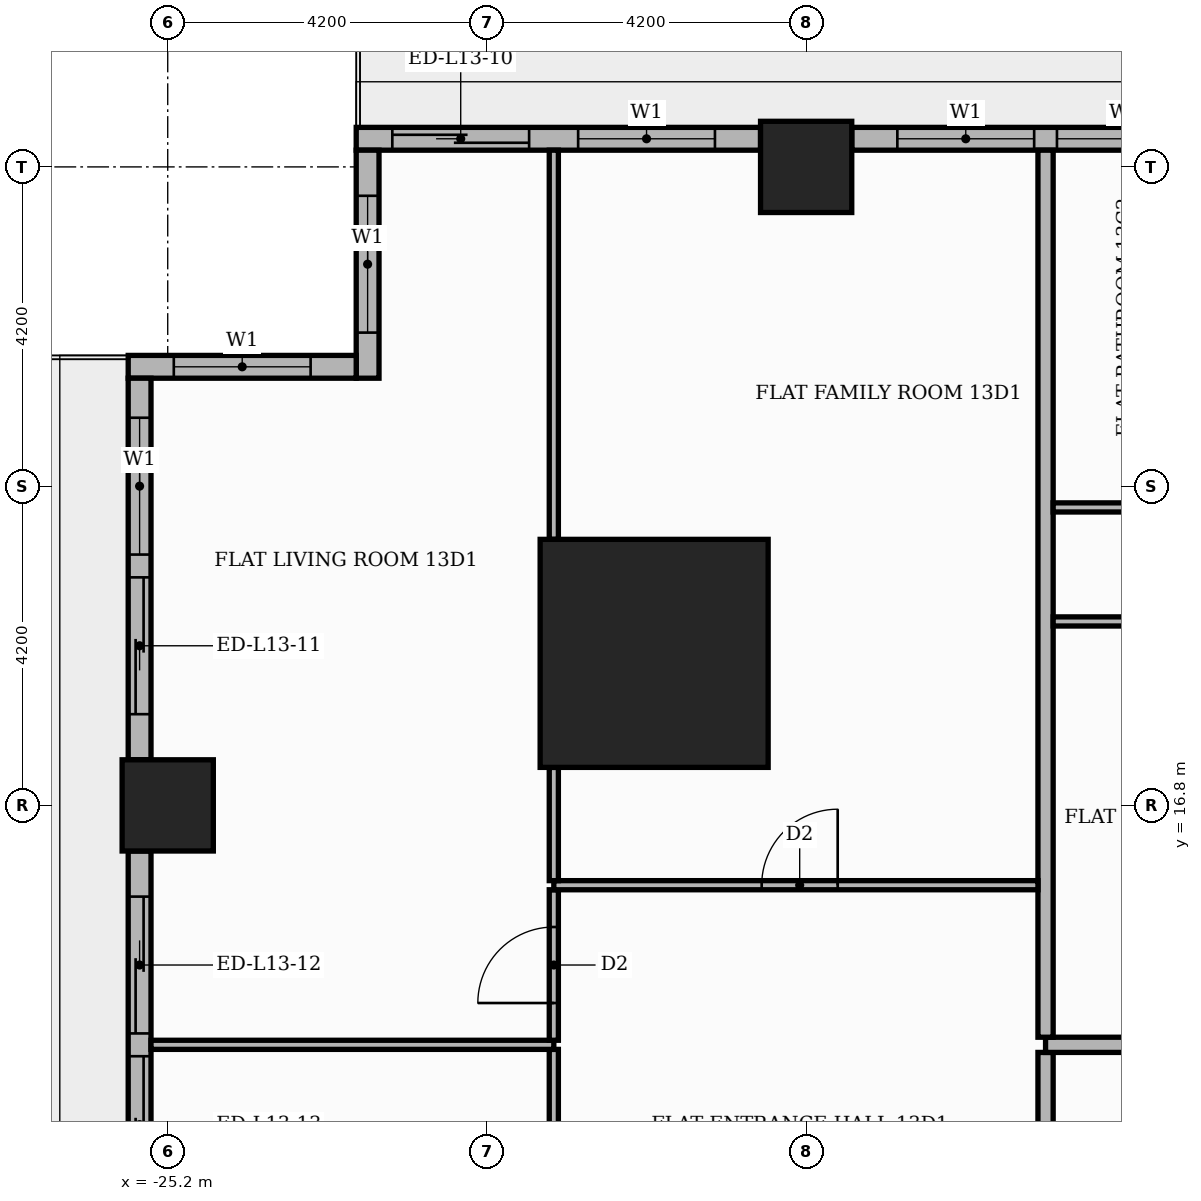
"""IFC4 building model, lengths in metres.
Left out: names, types, materials, properties, quantities, classifications, styles, units other than length and angle.
Written with IfcOpenShell. Run it as: python <this file> out.ifc"""

import sys

from ifc_helpers import new_model, si_unit, direction, frame, frame_2d, origin, origin_2d, place, context, subcontext, project, spatial, rectangle, extrude, element, fill, save


model = new_model("IFC4")
c1 = context("Model", 3, precision=1e-05, world=origin(), true_north=direction((0.0, 1.0)))
c2 = subcontext(c1, "Body", "Model", "MODEL_VIEW")
j1 = project(units=[si_unit("LENGTHUNIT", "METRE"), si_unit("PLANEANGLEUNIT", "RADIAN")], contexts=[c1])
p1 = place(None, origin())
s1 = spatial("IfcSite", under=j1, at=p1, CompositionType="ELEMENT")
p2 = place(p1, origin())
s2 = spatial("IfcBuilding", under=s1, at=p2, CompositionType="ELEMENT")
p3 = place(p2, frame((0.0, 0.0, 58.2)))
s3 = spatial("IfcBuildingStorey", under=s2, at=p3, CompositionType="ELEMENT", Elevation=58.2)
p4 = place(p3, frame((-18.8, 18.8, 0.0), z_axis=(0.0, 0.0, 1.0), x_axis=(1.0, 0.0, 0.0)))
e1 = element("IfcColumn", 1, at=p4, inside=s3, PredefinedType="COLUMN", context=c2, shape_type="SweptSolid", body=[
    extrude(rectangle(XDim=3.0, YDim=3.0, at=origin_2d()), origin(), (0.0, 0.0, 1.0), 3.9),
])
for number, where, z_axis, x_axis in (
    (2, (-16.8, 25.2, 0.0), (0.0, 0.0, 1.0), (1.0, 0.0, 0.0)),
    (3, (-25.2, 16.8, 0.0), (0.0, 0.0, 1.0), (1.0, 0.0, 0.0)),
):
    element("IfcColumn", number, at=place(p3, frame(where, z_axis=z_axis, x_axis=x_axis)), inside=s3, PredefinedType="COLUMN", context=c2, shape_type="SweptSolid", body=[
        extrude(rectangle(XDim=1.2, YDim=1.2, at=origin_2d()), origin(), (0.0, 0.0, 1.0), 3.9),
    ])
p5 = place(p3, frame((-9.0, 25.57, 0.0), z_axis=(0.0, 0.0, 1.0), x_axis=(-1.0, 0.0, 0.0)))
e4 = element("IfcWall", 4, at=p5, inside=s3, PredefinedType="STANDARD", context=c2, shape_type="SweptSolid", body=[
    extrude(rectangle(XDim=7.2, YDim=0.3, at=frame_2d((3.6, 0.0))), origin(), (0.0, 0.0, 1.0), 3.48),
])
p6 = place(p5, frame((0.6, 0.0, 0.9)))
e5 = element("IfcOpeningElement", 5, at=p6, cuts=e4, PredefinedType="OPENING", context=c2, shape_type="SweptSolid", body=[
    extrude(rectangle(XDim=1.8, YDim=2.1, at=frame_2d((0.9, 1.05))), frame((0.0, 0.16, 0.0), z_axis=(0.0, -1.0, 0.0), x_axis=(1.0, 0.0, 0.0)), (0.0, 0.0, 1.0), 0.32),
])
p7 = place(p5, frame((2.7, 0.0, 0.9)))
e6 = element("IfcOpeningElement", 6, at=p7, cuts=e4, PredefinedType="OPENING", context=c2, shape_type="SweptSolid", body=[
    extrude(rectangle(XDim=1.8, YDim=2.1, at=frame_2d((0.9, 1.05))), frame((0.0, 0.16, 0.0), z_axis=(0.0, -1.0, 0.0), x_axis=(1.0, 0.0, 0.0)), (0.0, 0.0, 1.0), 0.32),
])
p8 = place(p5, frame((4.8, 0.0, 0.9)))
e7 = element("IfcOpeningElement", 7, at=p8, cuts=e4, PredefinedType="OPENING", context=c2, shape_type="SweptSolid", body=[
    extrude(rectangle(XDim=1.8, YDim=2.1, at=frame_2d((0.9, 1.05))), frame((0.0, 0.16, 0.0), z_axis=(0.0, -1.0, 0.0), x_axis=(1.0, 0.0, 0.0)), (0.0, 0.0, 1.0), 0.32),
])
p9 = place(p3, frame((-17.4, 25.57, 0.0), z_axis=(0.0, 0.0, 1.0), x_axis=(-1.0, 0.0, 0.0)))
e8 = element("IfcWall", 8, at=p9, inside=s3, PredefinedType="STANDARD", context=c2, shape_type="SweptSolid", body=[
    extrude(rectangle(XDim=5.32, YDim=0.3, at=frame_2d((2.66, 0.0))), origin(), (0.0, 0.0, 1.0), 3.48),
])
p10 = place(p9, frame((0.6, 0.0, 0.9)))
e9 = element("IfcOpeningElement", 9, at=p10, cuts=e8, PredefinedType="OPENING", context=c2, shape_type="SweptSolid", body=[
    extrude(rectangle(XDim=1.8, YDim=2.1, at=frame_2d((0.9, 1.05))), frame((0.0, 0.16, 0.0), z_axis=(0.0, -1.0, 0.0), x_axis=(1.0, 0.0, 0.0)), (0.0, 0.0, 1.0), 0.32),
])
p11 = place(p9, frame((3.045, 0.0, 0.0)))
e10 = element("IfcOpeningElement", 10, at=p11, cuts=e8, PredefinedType="OPENING", context=c2, shape_type="SweptSolid", body=[
    extrude(rectangle(XDim=1.8, YDim=2.4, at=frame_2d((0.9, 1.2))), frame((0.0, 0.16, 0.0), z_axis=(0.0, -1.0, 0.0), x_axis=(1.0, 0.0, 0.0)), (0.0, 0.0, 1.0), 0.32),
])
p12 = place(p3, frame((-22.57, 25.42, 0.0), z_axis=(0.0, 0.0, 1.0), x_axis=(0.0, -1.0, 0.0)))
e11 = element("IfcWall", 11, at=p12, inside=s3, PredefinedType="STANDARD", context=c2, shape_type="SweptSolid", body=[
    extrude(rectangle(XDim=3.0, YDim=0.3, at=frame_2d((1.5, 0.0))), origin(), (0.0, 0.0, 1.0), 3.48),
])
p13 = place(p12, frame((0.6, 0.0, 0.9)))
e12 = element("IfcOpeningElement", 12, at=p13, cuts=e11, PredefinedType="OPENING", context=c2, shape_type="SweptSolid", body=[
    extrude(rectangle(XDim=1.8, YDim=2.1, at=frame_2d((0.9, 1.05))), frame((0.0, 0.16, 0.0), z_axis=(0.0, -1.0, 0.0), x_axis=(1.0, 0.0, 0.0)), (0.0, 0.0, 1.0), 0.32),
])
p14 = place(p3, frame((-22.72, 22.57, 0.0), z_axis=(0.0, 0.0, 1.0), x_axis=(-1.0, 0.0, 0.0)))
e13 = element("IfcWall", 13, at=p14, inside=s3, PredefinedType="STANDARD", context=c2, shape_type="SweptSolid", body=[
    extrude(rectangle(XDim=3.0, YDim=0.3, at=frame_2d((1.5, 0.0))), origin(), (0.0, 0.0, 1.0), 3.48),
])
p15 = place(p14, frame((0.6, 0.0, 0.9)))
e14 = element("IfcOpeningElement", 14, at=p15, cuts=e13, PredefinedType="OPENING", context=c2, shape_type="SweptSolid", body=[
    extrude(rectangle(XDim=1.8, YDim=2.1, at=frame_2d((0.9, 1.05))), frame((0.0, 0.16, 0.0), z_axis=(0.0, -1.0, 0.0), x_axis=(1.0, 0.0, 0.0)), (0.0, 0.0, 1.0), 0.32),
])
p16 = place(p3, frame((-25.57, 22.42, 0.0), z_axis=(0.0, 0.0, 1.0), x_axis=(0.0, -1.0, 0.0)))
e15 = element("IfcWall", 15, at=p16, inside=s3, PredefinedType="STANDARD", context=c2, shape_type="SweptSolid", body=[
    extrude(rectangle(XDim=5.02, YDim=0.3, at=frame_2d((2.51, 0.0))), origin(), (0.0, 0.0, 1.0), 3.48),
])
p17 = place(p16, frame((0.52, 0.0, 0.9)))
e16 = element("IfcOpeningElement", 16, at=p17, cuts=e15, PredefinedType="OPENING", context=c2, shape_type="SweptSolid", body=[
    extrude(rectangle(XDim=1.8, YDim=2.1, at=frame_2d((0.9, 1.05))), frame((0.0, 0.16, 0.0), z_axis=(0.0, -1.0, 0.0), x_axis=(1.0, 0.0, 0.0)), (0.0, 0.0, 1.0), 0.32),
])
p18 = place(p16, frame((2.62, 0.0, 0.0)))
e17 = element("IfcOpeningElement", 17, at=p18, cuts=e15, PredefinedType="OPENING", context=c2, shape_type="SweptSolid", body=[
    extrude(rectangle(XDim=1.8, YDim=2.4, at=frame_2d((0.9, 1.2))), frame((0.0, 0.16, 0.0), z_axis=(0.0, -1.0, 0.0), x_axis=(1.0, 0.0, 0.0)), (0.0, 0.0, 1.0), 0.32),
])
p19 = place(p3, frame((-25.57, 16.2, 0.0), z_axis=(0.0, 0.0, 1.0), x_axis=(0.0, -1.0, 0.0)))
e18 = element("IfcWall", 18, at=p19, inside=s3, PredefinedType="STANDARD", context=c2, shape_type="SweptSolid", body=[
    extrude(rectangle(XDim=7.2, YDim=0.3, at=frame_2d((3.6, 0.0))), origin(), (0.0, 0.0, 1.0), 3.48),
])
p20 = place(p19, frame((0.6, 0.0, 0.0)))
e19 = element("IfcOpeningElement", 19, at=p20, cuts=e18, PredefinedType="OPENING", context=c2, shape_type="SweptSolid", body=[
    extrude(rectangle(XDim=1.8, YDim=2.4, at=frame_2d((0.9, 1.2))), frame((0.0, 0.16, 0.0), z_axis=(0.0, -1.0, 0.0), x_axis=(1.0, 0.0, 0.0)), (0.0, 0.0, 1.0), 0.32),
])
p21 = place(p19, frame((2.7, 0.0, 0.0)))
e20 = element("IfcOpeningElement", 20, at=p21, cuts=e18, PredefinedType="OPENING", context=c2, shape_type="SweptSolid", body=[
    extrude(rectangle(XDim=1.8, YDim=2.4, at=frame_2d((0.9, 1.2))), frame((0.0, 0.16, 0.0), z_axis=(0.0, -1.0, 0.0), x_axis=(1.0, 0.0, 0.0)), (0.0, 0.0, 1.0), 0.32),
])
p22 = place(p19, frame((4.8, 0.0, 0.9)))
e21 = element("IfcOpeningElement", 21, at=p22, cuts=e18, PredefinedType="OPENING", context=c2, shape_type="SweptSolid", body=[
    extrude(rectangle(XDim=1.8, YDim=2.1, at=frame_2d((0.9, 1.05))), frame((0.0, 0.16, 0.0), z_axis=(0.0, -1.0, 0.0), x_axis=(1.0, 0.0, 0.0)), (0.0, 0.0, 1.0), 0.32),
])
p23 = place(p3, frame((-13.65, 5.35, 0.0), z_axis=(0.0, 0.0, 1.0), x_axis=(0.0, 1.0, 0.0)))
e22 = element("IfcWall", 22, at=p23, inside=s3, PredefinedType="PARTITIONING", context=c2, shape_type="SweptSolid", body=[
    extrude(rectangle(XDim=8.2, YDim=0.2, at=frame_2d((4.1, 0.0))), origin(), (0.0, 0.0, 1.0), 3.48),
])
p24 = place(p23, frame((5.65, 0.0, 0.0)))
e23 = element("IfcOpeningElement", 23, at=p24, cuts=e22, PredefinedType="OPENING", context=c2, shape_type="SweptSolid", body=[
    extrude(rectangle(XDim=1.1, YDim=2.4, at=frame_2d((0.55, 1.2))), frame((0.0, 0.11, 0.0), z_axis=(0.0, -1.0, 0.0), x_axis=(1.0, 0.0, 0.0)), (0.0, 0.0, 1.0), 0.22),
])
p25 = place(p3, frame((-20.12, 9.51, 0.0), z_axis=(0.0, 0.0, 1.0), x_axis=(0.0, 1.0, 0.0)))
e24 = element("IfcWall", 24, at=p25, inside=s3, PredefinedType="PARTITIONING", context=c2, shape_type="SweptSolid", body=[
    extrude(rectangle(XDim=4.08, YDim=0.12, at=frame_2d((2.04, 0.0))), origin(), (0.0, 0.0, 1.0), 3.48),
])
p26 = place(p25, frame((1.59, 0.0, 0.0)))
e25 = element("IfcOpeningElement", 25, at=p26, cuts=e24, PredefinedType="OPENING", context=c2, shape_type="SweptSolid", body=[
    extrude(rectangle(XDim=0.9, YDim=2.1, at=frame_2d((0.45, 1.05))), frame((0.0, 0.07, 0.0), z_axis=(0.0, -1.0, 0.0), x_axis=(1.0, 0.0, 0.0)), (0.0, 0.0, 1.0), 0.14),
])
p27 = place(p3, frame((-25.42, 13.65, 0.0), z_axis=(0.0, 0.0, 1.0), x_axis=(1.0, 0.0, 0.0)))
e26 = element("IfcWall", 26, at=p27, inside=s3, PredefinedType="PARTITIONING", context=c2, shape_type="SweptSolid", body=[
    extrude(rectangle(XDim=5.3, YDim=0.12, at=frame_2d((2.65, 0.0))), origin(), (0.0, 0.0, 1.0), 3.48),
])
p28 = place(p3, frame((-13.65, 13.65, 0.0), z_axis=(0.0, 0.0, 1.0), x_axis=(1.0, 0.0, 0.0)))
e27 = element("IfcWall", 27, at=p28, inside=s3, PredefinedType="PARTITIONING", context=c2, shape_type="SweptSolid", body=[
    extrude(rectangle(XDim=39.07, YDim=0.2, at=frame_2d((19.535, 0.0))), origin(), (0.0, 0.0, 1.0), 3.48),
])
p29 = place(p28, frame((24.65, 0.0, 0.0)))
e28 = element("IfcOpeningElement", 28, at=p29, cuts=e27, PredefinedType="OPENING", context=c2, shape_type="SweptSolid", body=[
    extrude(rectangle(XDim=1.1, YDim=2.4, at=frame_2d((0.55, 1.2))), frame((0.0, 0.11, 0.0), z_axis=(0.0, -1.0, 0.0), x_axis=(1.0, 0.0, 0.0)), (0.0, 0.0, 1.0), 0.22),
])
p30 = place(p28, frame((14.15, 0.0, 0.0)))
e29 = element("IfcOpeningElement", 29, at=p30, cuts=e27, PredefinedType="OPENING", context=c2, shape_type="SweptSolid", body=[
    extrude(rectangle(XDim=1.1, YDim=2.4, at=frame_2d((0.55, 1.2))), frame((0.0, 0.11, 0.0), z_axis=(0.0, -1.0, 0.0), x_axis=(1.0, 0.0, 0.0)), (0.0, 0.0, 1.0), 0.22),
])
p31 = place(p3, frame((-20.12, 13.71, 0.0), z_axis=(0.0, 0.0, 1.0), x_axis=(0.0, 1.0, 0.0)))
e30 = element("IfcWall", 30, at=p31, inside=s3, PredefinedType="PARTITIONING", context=c2, shape_type="SweptSolid", body=[
    extrude(rectangle(XDim=1.98, YDim=0.12, at=frame_2d((0.99, 0.0))), origin(), (0.0, 0.0, 1.0), 3.48),
])
p32 = place(p31, frame((0.49, 0.0, 0.0)))
e31 = element("IfcOpeningElement", 31, at=p32, cuts=e30, PredefinedType="OPENING", context=c2, shape_type="SweptSolid", body=[
    extrude(rectangle(XDim=1.0, YDim=2.1, at=frame_2d((0.5, 1.05))), frame((0.0, 0.07, 0.0), z_axis=(0.0, -1.0, 0.0), x_axis=(1.0, 0.0, 0.0)), (0.0, 0.0, 1.0), 0.14),
])
p33 = place(p3, frame((-13.65, 13.75, 0.0), z_axis=(0.0, 0.0, 1.0), x_axis=(0.0, 1.0, 0.0)))
e32 = element("IfcWall", 32, at=p33, inside=s3, PredefinedType="PARTITIONING", context=c2, shape_type="SweptSolid", body=[
    extrude(rectangle(XDim=11.67, YDim=0.2, at=frame_2d((5.835, 0.0))), origin(), (0.0, 0.0, 1.0), 3.48),
])
p34 = place(p3, frame((-20.12, 15.75, 0.0), z_axis=(0.0, 0.0, 1.0), x_axis=(1.0, 0.0, 0.0)))
e33 = element("IfcWall", 33, at=p34, inside=s3, PredefinedType="PARTITIONING", context=c2, shape_type="SweptSolid", body=[
    extrude(rectangle(XDim=6.37, YDim=0.12, at=frame_2d((3.185, 0.0))), origin(), (0.0, 0.0, 1.0), 3.48),
])
p35 = place(p34, frame((2.735, 0.0, 0.0)))
e34 = element("IfcOpeningElement", 34, at=p35, cuts=e33, PredefinedType="OPENING", context=c2, shape_type="SweptSolid", body=[
    extrude(rectangle(XDim=1.0, YDim=2.1, at=frame_2d((0.5, 1.05))), frame((0.0, 0.07, 0.0), z_axis=(0.0, -1.0, 0.0), x_axis=(1.0, 0.0, 0.0)), (0.0, 0.0, 1.0), 0.14),
])
p36 = place(p3, frame((-20.12, 15.81, 0.0), z_axis=(0.0, 0.0, 1.0), x_axis=(0.0, 1.0, 0.0)))
e35 = element("IfcWall", 35, at=p36, inside=s3, PredefinedType="PARTITIONING", context=c2, shape_type="SweptSolid", body=[
    extrude(rectangle(XDim=1.49, YDim=0.12, at=frame_2d((0.745, 0.0))), origin(), (0.0, 0.0, 1.0), 3.48),
])
p37 = place(p3, frame((-13.55, 19.22, 0.0), z_axis=(0.0, 0.0, 1.0), x_axis=(1.0, 0.0, 0.0)))
e36 = element("IfcWall", 36, at=p37, inside=s3, PredefinedType="PARTITIONING", context=c2, shape_type="SweptSolid", body=[
    extrude(rectangle(XDim=12.5, YDim=0.12, at=frame_2d((6.25, 0.0))), origin(), (0.0, 0.0, 1.0), 3.48),
])
p38 = place(p37, frame((8.9, 0.0, 0.0)))
e37 = element("IfcOpeningElement", 37, at=p38, cuts=e36, PredefinedType="OPENING", context=c2, shape_type="SweptSolid", body=[
    extrude(rectangle(XDim=0.9, YDim=2.1, at=frame_2d((0.45, 1.05))), frame((0.0, 0.07, 0.0), z_axis=(0.0, -1.0, 0.0), x_axis=(1.0, 0.0, 0.0)), (0.0, 0.0, 1.0), 0.14),
])
p39 = place(p37, frame((4.55, 0.0, 0.0)))
e38 = element("IfcOpeningElement", 38, at=p39, cuts=e36, PredefinedType="OPENING", context=c2, shape_type="SweptSolid", body=[
    extrude(rectangle(XDim=0.9, YDim=2.1, at=frame_2d((0.45, 1.05))), frame((0.0, 0.07, 0.0), z_axis=(0.0, -1.0, 0.0), x_axis=(1.0, 0.0, 0.0)), (0.0, 0.0, 1.0), 0.14),
])
p40 = place(p37, frame((1.4, 0.0, 0.0)))
e39 = element("IfcOpeningElement", 39, at=p40, cuts=e36, PredefinedType="OPENING", context=c2, shape_type="SweptSolid", body=[
    extrude(rectangle(XDim=0.9, YDim=2.1, at=frame_2d((0.45, 1.05))), frame((0.0, 0.07, 0.0), z_axis=(0.0, -1.0, 0.0), x_axis=(1.0, 0.0, 0.0)), (0.0, 0.0, 1.0), 0.14),
])
p41 = place(p3, frame((-20.12, 20.3, 0.0), z_axis=(0.0, 0.0, 1.0), x_axis=(0.0, 1.0, 0.0)))
e40 = element("IfcWall", 40, at=p41, inside=s3, PredefinedType="PARTITIONING", context=c2, shape_type="SweptSolid", body=[
    extrude(rectangle(XDim=5.12, YDim=0.12, at=frame_2d((2.56, 0.0))), origin(), (0.0, 0.0, 1.0), 3.48),
])
p42 = place(p3, frame((-13.55, 20.72, 0.0), z_axis=(0.0, 0.0, 1.0), x_axis=(1.0, 0.0, 0.0)))
e41 = element("IfcWall", 41, at=p42, inside=s3, PredefinedType="PARTITIONING", context=c2, shape_type="SweptSolid", body=[
    extrude(rectangle(XDim=18.7, YDim=0.12, at=frame_2d((9.35, 0.0))), origin(), (0.0, 0.0, 1.0), 3.48),
])
p43 = place(p42, frame((16.2, 0.0, 0.0)))
e42 = element("IfcOpeningElement", 42, at=p43, cuts=e41, PredefinedType="OPENING", context=c2, shape_type="SweptSolid", body=[
    extrude(rectangle(XDim=1.0, YDim=2.1, at=frame_2d((0.5, 1.05))), frame((0.0, 0.07, 0.0), z_axis=(0.0, -1.0, 0.0), x_axis=(1.0, 0.0, 0.0)), (0.0, 0.0, 1.0), 0.14),
])
p44 = place(p42, frame((12.05, 0.0, 0.0)))
e43 = element("IfcOpeningElement", 43, at=p44, cuts=e41, PredefinedType="OPENING", context=c2, shape_type="SweptSolid", body=[
    extrude(rectangle(XDim=0.9, YDim=2.1, at=frame_2d((0.45, 1.05))), frame((0.0, 0.07, 0.0), z_axis=(0.0, -1.0, 0.0), x_axis=(1.0, 0.0, 0.0)), (0.0, 0.0, 1.0), 0.14),
])
p45 = place(p42, frame((3.65, 0.0, 0.0)))
e44 = element("IfcOpeningElement", 44, at=p45, cuts=e41, PredefinedType="OPENING", context=c2, shape_type="SweptSolid", body=[
    extrude(rectangle(XDim=0.9, YDim=2.1, at=frame_2d((0.45, 1.05))), frame((0.0, 0.07, 0.0), z_axis=(0.0, -1.0, 0.0), x_axis=(1.0, 0.0, 0.0)), (0.0, 0.0, 1.0), 0.14),
])
p46 = place(p7, origin())
e45 = element("IfcWindow", 45, at=p46, inside=s3, PartitioningType="SINGLE_PANEL", PredefinedType="WINDOW", context=c2, shape_type="SweptSolid", body=[
    extrude(rectangle(XDim=1.8, YDim=2.1, at=frame_2d((0.9, 1.05))), frame((0.0, 0.03, 0.0), z_axis=(0.0, -1.0, 0.0), x_axis=(1.0, 0.0, 0.0)), (0.0, 0.0, 1.0), 0.06),
])
fill(e6, e45)
p47 = place(p8, origin())
e46 = element("IfcWindow", 46, at=p47, inside=s3, PartitioningType="SINGLE_PANEL", PredefinedType="WINDOW", context=c2, shape_type="SweptSolid", body=[
    extrude(rectangle(XDim=1.8, YDim=2.1, at=frame_2d((0.9, 1.05))), frame((0.0, 0.03, 0.0), z_axis=(0.0, -1.0, 0.0), x_axis=(1.0, 0.0, 0.0)), (0.0, 0.0, 1.0), 0.06),
])
fill(e7, e46)
p48 = place(p10, origin())
e47 = element("IfcWindow", 47, at=p48, inside=s3, PartitioningType="SINGLE_PANEL", PredefinedType="WINDOW", context=c2, shape_type="SweptSolid", body=[
    extrude(rectangle(XDim=1.8, YDim=2.1, at=frame_2d((0.9, 1.05))), frame((0.0, 0.03, 0.0), z_axis=(0.0, -1.0, 0.0), x_axis=(1.0, 0.0, 0.0)), (0.0, 0.0, 1.0), 0.06),
])
fill(e9, e47)
p49 = place(p11, origin())
e48 = element("IfcDoor", 48, at=p49, inside=s3, OperationType="SLIDING_TO_RIGHT", PredefinedType="DOOR", context=c2, shape_type="SweptSolid", body=[
    extrude(rectangle(XDim=1.8, YDim=2.4, at=frame_2d((0.9, 1.2))), frame((0.0, 0.025, 0.0), z_axis=(0.0, -1.0, 0.0), x_axis=(1.0, 0.0, 0.0)), (0.0, 0.0, 1.0), 0.05),
])
fill(e10, e48)
p50 = place(p13, origin())
e49 = element("IfcWindow", 49, at=p50, inside=s3, PartitioningType="SINGLE_PANEL", PredefinedType="WINDOW", context=c2, shape_type="SweptSolid", body=[
    extrude(rectangle(XDim=1.8, YDim=2.1, at=frame_2d((0.9, 1.05))), frame((0.0, 0.03, 0.0), z_axis=(0.0, -1.0, 0.0), x_axis=(1.0, 0.0, 0.0)), (0.0, 0.0, 1.0), 0.06),
])
fill(e12, e49)
p51 = place(p15, origin())
e50 = element("IfcWindow", 50, at=p51, inside=s3, PartitioningType="SINGLE_PANEL", PredefinedType="WINDOW", context=c2, shape_type="SweptSolid", body=[
    extrude(rectangle(XDim=1.8, YDim=2.1, at=frame_2d((0.9, 1.05))), frame((0.0, 0.03, 0.0), z_axis=(0.0, -1.0, 0.0), x_axis=(1.0, 0.0, 0.0)), (0.0, 0.0, 1.0), 0.06),
])
fill(e14, e50)
p52 = place(p17, origin())
e51 = element("IfcWindow", 51, at=p52, inside=s3, PartitioningType="SINGLE_PANEL", PredefinedType="WINDOW", context=c2, shape_type="SweptSolid", body=[
    extrude(rectangle(XDim=1.8, YDim=2.1, at=frame_2d((0.9, 1.05))), frame((0.0, 0.03, 0.0), z_axis=(0.0, -1.0, 0.0), x_axis=(1.0, 0.0, 0.0)), (0.0, 0.0, 1.0), 0.06),
])
fill(e16, e51)
p53 = place(p18, origin())
e52 = element("IfcDoor", 52, at=p53, inside=s3, OperationType="SLIDING_TO_RIGHT", PredefinedType="DOOR", context=c2, shape_type="SweptSolid", body=[
    extrude(rectangle(XDim=1.8, YDim=2.4, at=frame_2d((0.9, 1.2))), frame((0.0, 0.025, 0.0), z_axis=(0.0, -1.0, 0.0), x_axis=(1.0, 0.0, 0.0)), (0.0, 0.0, 1.0), 0.05),
])
fill(e17, e52)
p54 = place(p20, origin())
e53 = element("IfcDoor", 53, at=p54, inside=s3, OperationType="SLIDING_TO_LEFT", PredefinedType="DOOR", context=c2, shape_type="SweptSolid", body=[
    extrude(rectangle(XDim=1.8, YDim=2.4, at=frame_2d((0.9, 1.2))), frame((0.0, 0.025, 0.0), z_axis=(0.0, -1.0, 0.0), x_axis=(1.0, 0.0, 0.0)), (0.0, 0.0, 1.0), 0.05),
])
fill(e19, e53)
p55 = place(p21, origin())
e54 = element("IfcDoor", 54, at=p55, inside=s3, OperationType="SLIDING_TO_RIGHT", PredefinedType="DOOR", context=c2, shape_type="SweptSolid", body=[
    extrude(rectangle(XDim=1.8, YDim=2.4, at=frame_2d((0.9, 1.2))), frame((0.0, 0.025, 0.0), z_axis=(0.0, -1.0, 0.0), x_axis=(1.0, 0.0, 0.0)), (0.0, 0.0, 1.0), 0.05),
])
fill(e20, e54)
p56 = place(p35, origin())
e55 = element("IfcDoor", 55, at=p56, inside=s3, OperationType="SINGLE_SWING_RIGHT", PredefinedType="DOOR", context=c2, shape_type="SweptSolid", body=[
    extrude(rectangle(XDim=1.0, YDim=2.1, at=frame_2d((0.5, 1.05))), frame((0.0, 0.025, 0.0), z_axis=(0.0, -1.0, 0.0), x_axis=(1.0, 0.0, 0.0)), (0.0, 0.0, 1.0), 0.05),
])
fill(e34, e55)
p57 = place(p32, origin())
e56 = element("IfcDoor", 56, at=p57, inside=s3, OperationType="SINGLE_SWING_LEFT", PredefinedType="DOOR", context=c2, shape_type="SweptSolid", body=[
    extrude(rectangle(XDim=1.0, YDim=2.1, at=frame_2d((0.5, 1.05))), frame((0.0, 0.025, 0.0), z_axis=(0.0, -1.0, 0.0), x_axis=(1.0, 0.0, 0.0)), (0.0, 0.0, 1.0), 0.05),
])
fill(e31, e56)
save(model, sys.argv[1])
